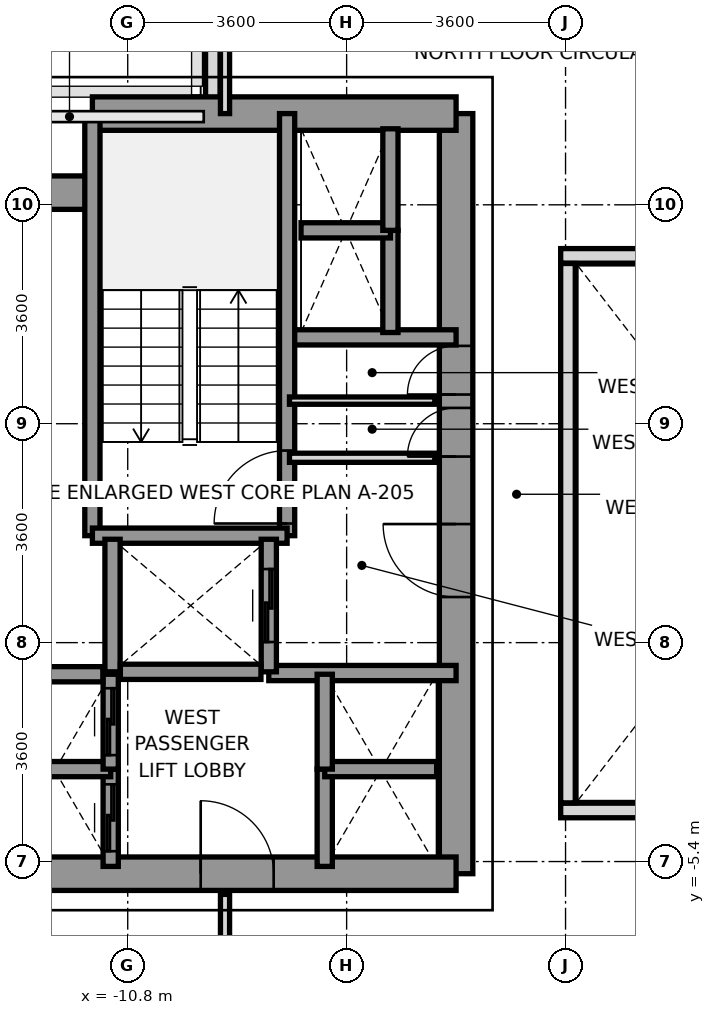
"""IFC4 building model, lengths in metres.
Left out: names, types, materials, properties, quantities, classifications, styles, units other than length and angle.
Written with IfcOpenShell. Run it as: python <this file> out.ifc"""

import sys

from ifc_helpers import new_model, si_unit, direction, frame, frame_2d, origin, place, context, subcontext, project, spatial, rectangle, extrude, source, transform, mapped, element, fill, save


model = new_model("IFC4")
c1 = context("Model", 3, precision=1e-05, world=origin(), true_north=direction((0.0, 1.0)))
c2 = subcontext(c1, "Body", "Model", "MODEL_VIEW")
j1 = project(units=[si_unit("LENGTHUNIT", "METRE"), si_unit("PLANEANGLEUNIT", "RADIAN")], contexts=[c1])
p1 = place(None, origin())
s1 = spatial("IfcSite", under=j1, at=p1, CompositionType="ELEMENT")
p2 = place(p1, origin())
s2 = spatial("IfcBuilding", under=s1, at=p2, CompositionType="ELEMENT")
p3 = place(p2, frame((0.0, 0.0, 47.6)))
s3 = spatial("IfcBuildingStorey", under=s2, at=p3, CompositionType="ELEMENT", Elevation=47.6)
p4 = place(p3, frame((-9.4, 6.953, 0.0), z_axis=(0.0, 0.0, 1.0), x_axis=(0.0, 1.0, 0.0)))
e1 = element("IfcWall", 1, at=p4, inside=s3, PredefinedType="PARAPET", context=c2, shape_type="SweptSolid", body=[
    extrude(rectangle(XDim=1.444, YDim=0.24, at=frame_2d((0.722, 0.0))), origin(), (0.0, 0.0, 1.0), 1.15),
])
p5 = place(p3, frame((-5.4, -5.6, 0.0), z_axis=(0.0, 0.0, 1.0), x_axis=(0.0, 1.0, 0.0)))
e2 = element("IfcWall", 2, at=p5, inside=s3, PredefinedType="SHEAR", context=c2, shape_type="SweptSolid", body=[
    extrude(rectangle(XDim=12.5, YDim=0.55, at=frame_2d((6.25, 0.0))), origin(), (0.0, 0.0, 1.0), 3.2),
])
p6 = place(p5, frame((4.55, 0.0, 0.0)))
e3 = element("IfcOpeningElement", 3, at=p6, cuts=e2, PredefinedType="OPENING", context=c2, shape_type="SweptSolid", body=[
    extrude(rectangle(XDim=1.2, YDim=2.2, at=frame_2d((0.6, 1.1))), frame((0.0, 0.285, 0.0), z_axis=(0.0, -1.0, 0.0), x_axis=(1.0, 0.0, 0.0)), (0.0, 0.0, 1.0), 0.57),
])
p7 = place(p5, frame((6.86, 0.0, 0.0)))
e4 = element("IfcOpeningElement", 4, at=p7, cuts=e2, PredefinedType="OPENING", context=c2, shape_type="SweptSolid", body=[
    extrude(rectangle(XDim=0.8, YDim=2.1, at=frame_2d((0.4, 1.05))), frame((0.0, 0.285, 0.0), z_axis=(0.0, -1.0, 0.0), x_axis=(1.0, 0.0, 0.0)), (0.0, 0.0, 1.0), 0.57),
])
p8 = place(p5, frame((7.88, 0.0, 0.0)))
e5 = element("IfcOpeningElement", 5, at=p8, cuts=e2, PredefinedType="OPENING", context=c2, shape_type="SweptSolid", body=[
    extrude(rectangle(XDim=0.8, YDim=2.1, at=frame_2d((0.4, 1.05))), frame((0.0, 0.285, 0.0), z_axis=(0.0, -1.0, 0.0), x_axis=(1.0, 0.0, 0.0)), (0.0, 0.0, 1.0), 0.57),
])
p9 = place(p3, frame((-11.381, 6.9, 0.0), z_axis=(0.0, 0.0, 1.0), x_axis=(1.0, 0.0, 0.0)))
e6 = element("IfcWall", 6, at=p9, inside=s3, PredefinedType="SHEAR", context=c2, shape_type="SweptSolid", body=[
    extrude(rectangle(XDim=5.981, YDim=0.55, at=frame_2d((2.991, 0.0))), origin(), (0.0, 0.0, 1.0), 3.2),
])
p10 = place(p3, frame((-13.2, 5.6, 0.0), z_axis=(0.0, 0.0, 1.0), x_axis=(1.0, 0.0, 0.0)))
e7 = element("IfcWall", 7, at=p10, inside=s3, PredefinedType="SHEAR", context=c2, shape_type="SweptSolid", body=[
    extrude(rectangle(XDim=1.819, YDim=0.55, at=frame_2d((0.909, 0.0))), origin(), (0.0, 0.0, 1.0), 3.2),
])
p11 = place(p3, frame((-13.2, -5.6, 0.0), z_axis=(0.0, 0.0, 1.0), x_axis=(1.0, 0.0, 0.0)))
e8 = element("IfcWall", 8, at=p11, inside=s3, PredefinedType="SHEAR", context=c2, shape_type="SweptSolid", body=[
    extrude(rectangle(XDim=7.8, YDim=0.55, at=frame_2d((3.9, 0.0))), origin(), (0.0, 0.0, 1.0), 3.2),
])
p12 = place(p11, frame((3.6, 0.0, 0.0)))
e9 = element("IfcOpeningElement", 9, at=p12, cuts=e8, PredefinedType="OPENING", context=c2, shape_type="SweptSolid", body=[
    extrude(rectangle(XDim=1.2, YDim=2.2, at=frame_2d((0.6, 1.1))), frame((0.0, 0.285, 0.0), z_axis=(0.0, -1.0, 0.0), x_axis=(1.0, 0.0, 0.0)), (0.0, 0.0, 1.0), 0.57),
])
p13 = place(p3, frame((-8.18, 3.22, 0.0), z_axis=(0.0, 0.0, 1.0), x_axis=(1.0, 0.0, 0.0)))
e10 = element("IfcWall", 10, at=p13, inside=s3, PredefinedType="SOLIDWALL", context=c2, shape_type="SweptSolid", body=[
    extrude(rectangle(XDim=2.78, YDim=0.25, at=frame_2d((1.39, 0.0))), origin(), (0.0, 0.0, 1.0), 3.2),
])
p14 = place(p3, frame((-8.48, -2.3, 0.0), z_axis=(0.0, 0.0, 1.0), x_axis=(1.0, 0.0, 0.0)))
e11 = element("IfcWall", 11, at=p14, inside=s3, PredefinedType="SOLIDWALL", context=c2, shape_type="SweptSolid", body=[
    extrude(rectangle(XDim=3.08, YDim=0.25, at=frame_2d((1.54, 0.0))), origin(), (0.0, 0.0, 1.0), 3.2),
])
p15 = place(p3, frame((-8.179, -0.041, 0.0), z_axis=(0.0, 0.0, 1.0), x_axis=(0.0, 1.0, 0.0)))
e12 = element("IfcWall", 12, at=p15, inside=s3, PredefinedType="SOLIDWALL", context=c2, shape_type="SweptSolid", body=[
    extrude(rectangle(XDim=6.941, YDim=0.25, at=frame_2d((3.47, 0.0))), origin(), (0.0, 0.0, 1.0), 3.2),
])
p16 = place(p15, frame((0.2, 0.0, 0.0)))
e13 = element("IfcOpeningElement", 13, at=p16, cuts=e12, PredefinedType="OPENING", context=c2, shape_type="SweptSolid", body=[
    extrude(rectangle(XDim=1.2, YDim=2.2, at=frame_2d((0.6, 1.1))), frame((0.0, 0.135, 0.0), z_axis=(0.0, -1.0, 0.0), x_axis=(1.0, 0.0, 0.0)), (0.0, 0.0, 1.0), 0.27),
])
p17 = place(p3, frame((-11.381, -0.041, 0.0), z_axis=(0.0, 0.0, 1.0), x_axis=(0.0, 1.0, 0.0)))
e14 = element("IfcWall", 14, at=p17, inside=s3, PredefinedType="SOLIDWALL", context=c2, shape_type="SweptSolid", body=[
    extrude(rectangle(XDim=6.941, YDim=0.25, at=frame_2d((3.47, 0.0))), origin(), (0.0, 0.0, 1.0), 3.2),
])
p18 = place(p3, frame((-11.381, -0.041, 0.0), z_axis=(0.0, 0.0, 1.0), x_axis=(1.0, 0.0, 0.0)))
e15 = element("IfcWall", 15, at=p18, inside=s3, PredefinedType="SOLIDWALL", context=c2, shape_type="SweptSolid", body=[
    extrude(rectangle(XDim=3.202, YDim=0.25, at=frame_2d((1.601, 0.0))), origin(), (0.0, 0.0, 1.0), 3.2),
])
p19 = place(p3, frame((-11.05, -2.28, 0.0), z_axis=(0.0, 0.0, 1.0), x_axis=(0.0, 1.0, 0.0)))
e16 = element("IfcWall", 16, at=p19, inside=s3, PredefinedType="SOLIDWALL", context=c2, shape_type="SweptSolid", body=[
    extrude(rectangle(XDim=2.18, YDim=0.25, at=frame_2d((1.09, 0.0))), origin(), (0.0, 0.0, 1.0), 3.2),
])
p20 = place(p3, frame((-8.48, -2.28, 0.0), z_axis=(0.0, 0.0, 1.0), x_axis=(0.0, 1.0, 0.0)))
e17 = element("IfcWall", 17, at=p20, inside=s3, PredefinedType="SOLIDWALL", context=c2, shape_type="SweptSolid", body=[
    extrude(rectangle(XDim=2.18, YDim=0.25, at=frame_2d((1.09, 0.0))), origin(), (0.0, 0.0, 1.0), 3.2),
])
p21 = place(p20, frame((0.49, 0.0, 0.0)))
e18 = element("IfcOpeningElement", 18, at=p21, cuts=e17, PredefinedType="OPENING", context=c2, shape_type="SweptSolid", body=[
    extrude(rectangle(XDim=1.2, YDim=2.2, at=frame_2d((0.6, 1.1))), frame((0.0, 0.135, 0.0), z_axis=(0.0, -1.0, 0.0), x_axis=(1.0, 0.0, 0.0)), (0.0, 0.0, 1.0), 0.27),
])
p22 = place(p3, frame((-10.921, -2.28, 0.0), z_axis=(0.0, 0.0, 1.0), x_axis=(1.0, 0.0, 0.0)))
e19 = element("IfcWall", 19, at=p22, inside=s3, PredefinedType="SOLIDWALL", context=c2, shape_type="SweptSolid", body=[
    extrude(rectangle(XDim=2.312, YDim=0.25, at=frame_2d((1.156, 0.0))), origin(), (0.0, 0.0, 1.0), 3.2),
])
p23 = place(p3, frame((-11.08, -5.48, 0.0), z_axis=(0.0, 0.0, 1.0), x_axis=(0.0, 1.0, 0.0)))
e20 = element("IfcWall", 20, at=p23, inside=s3, PredefinedType="SOLIDWALL", context=c2, shape_type="SweptSolid", body=[
    extrude(rectangle(XDim=1.6, YDim=0.25, at=frame_2d((0.8, 0.0))), origin(), (0.0, 0.0, 1.0), 3.2),
])
p24 = place(p23, frame((0.25, 0.0, 0.0)))
e21 = element("IfcOpeningElement", 21, at=p24, cuts=e20, PredefinedType="OPENING", context=c2, shape_type="SweptSolid", body=[
    extrude(rectangle(XDim=1.1, YDim=2.2, at=frame_2d((0.55, 1.1))), frame((0.0, 0.135, 0.0), z_axis=(0.0, -1.0, 0.0), x_axis=(1.0, 0.0, 0.0)), (0.0, 0.0, 1.0), 0.27),
])
p25 = place(p3, frame((-12.92, -3.88, 0.0), z_axis=(0.0, 0.0, 1.0), x_axis=(1.0, 0.0, 0.0)))
e22 = element("IfcWall", 22, at=p25, inside=s3, PredefinedType="SOLIDWALL", context=c2, shape_type="SweptSolid", body=[
    extrude(rectangle(XDim=1.84, YDim=0.25, at=frame_2d((0.92, 0.0))), origin(), (0.0, 0.0, 1.0), 3.2),
])
p26 = place(p3, frame((-11.08, -3.88, 0.0), z_axis=(0.0, 0.0, 1.0), x_axis=(0.0, 1.0, 0.0)))
e23 = element("IfcWall", 23, at=p26, inside=s3, PredefinedType="SOLIDWALL", context=c2, shape_type="SweptSolid", body=[
    extrude(rectangle(XDim=1.56, YDim=0.25, at=frame_2d((0.78, 0.0))), origin(), (0.0, 0.0, 1.0), 3.2),
])
p27 = place(p26, frame((0.23, 0.0, 0.0)))
e24 = element("IfcOpeningElement", 24, at=p27, cuts=e23, PredefinedType="OPENING", context=c2, shape_type="SweptSolid", body=[
    extrude(rectangle(XDim=1.1, YDim=2.2, at=frame_2d((0.55, 1.1))), frame((0.0, 0.135, 0.0), z_axis=(0.0, -1.0, 0.0), x_axis=(1.0, 0.0, 0.0)), (0.0, 0.0, 1.0), 0.27),
])
p28 = place(p3, frame((-12.791, -2.32, 0.0), z_axis=(0.0, 0.0, 1.0), x_axis=(1.0, 0.0, 0.0)))
e25 = element("IfcWall", 25, at=p28, inside=s3, PredefinedType="SOLIDWALL", context=c2, shape_type="SweptSolid", body=[
    extrude(rectangle(XDim=1.582, YDim=0.25, at=frame_2d((0.791, 0.0))), origin(), (0.0, 0.0, 1.0), 3.2),
])
p29 = place(p3, frame((-7.56, -5.48, 0.0), z_axis=(0.0, 0.0, 1.0), x_axis=(0.0, 1.0, 0.0)))
e26 = element("IfcWall", 26, at=p29, inside=s3, PredefinedType="SOLIDWALL", context=c2, shape_type="SweptSolid", body=[
    extrude(rectangle(XDim=1.6, YDim=0.25, at=frame_2d((0.8, 0.0))), origin(), (0.0, 0.0, 1.0), 3.2),
])
p30 = place(p3, frame((-7.56, -3.88, 0.0), z_axis=(0.0, 0.0, 1.0), x_axis=(1.0, 0.0, 0.0)))
e27 = element("IfcWall", 27, at=p30, inside=s3, PredefinedType="SOLIDWALL", context=c2, shape_type="SweptSolid", body=[
    extrude(rectangle(XDim=1.84, YDim=0.25, at=frame_2d((0.92, 0.0))), origin(), (0.0, 0.0, 1.0), 3.2),
])
p31 = place(p3, frame((-7.56, -3.88, 0.0), z_axis=(0.0, 0.0, 1.0), x_axis=(0.0, 1.0, 0.0)))
e28 = element("IfcWall", 28, at=p31, inside=s3, PredefinedType="SOLIDWALL", context=c2, shape_type="SweptSolid", body=[
    extrude(rectangle(XDim=1.56, YDim=0.25, at=frame_2d((0.78, 0.0))), origin(), (0.0, 0.0, 1.0), 3.2),
])
p32 = place(p3, frame((-6.48, 3.3, 0.0), z_axis=(0.0, 0.0, 1.0), x_axis=(0.0, 1.0, 0.0)))
e29 = element("IfcWall", 29, at=p32, inside=s3, PredefinedType="SOLIDWALL", context=c2, shape_type="SweptSolid", body=[
    extrude(rectangle(XDim=1.68, YDim=0.25, at=frame_2d((0.84, 0.0))), origin(), (0.0, 0.0, 1.0), 3.2),
])
p33 = place(p3, frame((-7.95, 4.98, 0.0), z_axis=(0.0, 0.0, 1.0), x_axis=(1.0, 0.0, 0.0)))
e30 = element("IfcWall", 30, at=p33, inside=s3, PredefinedType="SOLIDWALL", context=c2, shape_type="SweptSolid", body=[
    extrude(rectangle(XDim=1.47, YDim=0.25, at=frame_2d((0.735, 0.0))), origin(), (0.0, 0.0, 1.0), 3.2),
])
p34 = place(p3, frame((-6.48, 4.98, 0.0), z_axis=(0.0, 0.0, 1.0), x_axis=(0.0, 1.0, 0.0)))
e31 = element("IfcWall", 31, at=p34, inside=s3, PredefinedType="SOLIDWALL", context=c2, shape_type="SweptSolid", body=[
    extrude(rectangle(XDim=1.67, YDim=0.25, at=frame_2d((0.835, 0.0))), origin(), (0.0, 0.0, 1.0), 3.2),
])
p35 = place(p3, frame((-8.14, 1.24, 0.0), z_axis=(0.0, 0.0, 1.0), x_axis=(1.0, 0.0, 0.0)))
e32 = element("IfcWall", 32, at=p35, inside=s3, PredefinedType="PARTITIONING", context=c2, shape_type="SweptSolid", body=[
    extrude(rectangle(XDim=2.39, YDim=0.15, at=frame_2d((1.195, 0.0))), origin(), (0.0, 0.0, 1.0), 2.3),
])
p36 = place(p3, frame((-8.14, 2.18, 0.0), z_axis=(0.0, 0.0, 1.0), x_axis=(1.0, 0.0, 0.0)))
e33 = element("IfcWall", 33, at=p36, inside=s3, PredefinedType="PARTITIONING", context=c2, shape_type="SweptSolid", body=[
    extrude(rectangle(XDim=2.39, YDim=0.12, at=frame_2d((1.195, 0.0))), origin(), (0.0, 0.0, 1.0), 2.3),
])
p37 = place(p3, frame((-9.2, 6.9, 0.0), z_axis=(0.0, 0.0, 1.0), x_axis=(0.0, 1.0, 0.0)))
e34 = element("IfcWall", 34, at=p37, inside=s3, PredefinedType="PARTITIONING", context=c2, shape_type="SweptSolid", body=[
    extrude(rectangle(XDim=8.78, YDim=0.15, at=frame_2d((4.39, 0.0))), origin(), (0.0, 0.0, 1.0), 2.71),
])
p38 = place(p3, frame((-9.2, -15.68, 0.0), z_axis=(0.0, 0.0, 1.0), x_axis=(0.0, 1.0, 0.0)))
e35 = element("IfcWall", 35, at=p38, inside=s3, PredefinedType="PARTITIONING", context=c2, shape_type="SweptSolid", body=[
    extrude(rectangle(XDim=9.74, YDim=0.15, at=frame_2d((4.87, 0.0))), origin(), (0.0, 0.0, 1.0), 2.71),
])
for number, where, z_axis, x_axis in (
    (36, (-3.68, -4.56, 0.0), (0.0, 0.0, 1.0), (1.0, 0.0, 0.0)),
    (37, (-3.68, 4.56, 0.0), (0.0, 0.0, 1.0), (1.0, 0.0, 0.0)),
):
    element("IfcWall", number, at=place(p3, frame(where, z_axis=z_axis, x_axis=x_axis)), inside=s3, PredefinedType="PARAPET", context=c2, shape_type="SweptSolid", body=[
        extrude(rectangle(XDim=7.36, YDim=0.24, at=frame_2d((3.68, 0.0))), origin(), (0.0, 0.0, 1.0), 1.15),
    ])
p39 = place(p3, frame((-3.56, -4.435, 0.0), z_axis=(0.0, 0.0, 1.0), x_axis=(0.0, 1.0, 0.0)))
e38 = element("IfcWall", 38, at=p39, inside=s3, PredefinedType="PARAPET", context=c2, shape_type="SweptSolid", body=[
    extrude(rectangle(XDim=8.87, YDim=0.24, at=frame_2d((4.435, 0.0))), origin(), (0.0, 0.0, 1.0), 1.15),
])
m1 = source(origin(), c2, "Body", "SweptSolid", [
    extrude(rectangle(XDim=1.2, YDim=2.2, at=frame_2d((0.6, 1.1))), frame((0.0, 0.025, 0.0), z_axis=(0.0, -1.0, 0.0), x_axis=(1.0, 0.0, 0.0)), (0.0, 0.0, 1.0), 0.05),
])
p40 = place(p16, origin())
e39 = element("IfcDoor", 39, at=p40, inside=s3, OperationType="SINGLE_SWING_LEFT", PredefinedType="DOOR", context=c2, shape_type="MappedRepresentation", body=[
    mapped(m1, transform((0.0, 0.0, 0.0), x_axis=(1.0, 0.0, 0.0), y_axis=(0.0, 1.0, 0.0), z_axis=(0.0, 0.0, 1.0), scale=1.0)),
])
fill(e13, e39)
p41 = place(p6, origin())
e40 = element("IfcDoor", 40, at=p41, inside=s3, OperationType="SINGLE_SWING_RIGHT", PredefinedType="DOOR", context=c2, shape_type="MappedRepresentation", body=[
    mapped(m1, transform((0.0, 0.0, 0.0), x_axis=(1.0, 0.0, 0.0), y_axis=(0.0, 1.0, 0.0), z_axis=(0.0, 0.0, 1.0), scale=1.0)),
])
fill(e3, e40)
p42 = place(p12, origin())
e41 = element("IfcDoor", 41, at=p42, inside=s3, OperationType="SINGLE_SWING_LEFT", PredefinedType="DOOR", context=c2, shape_type="MappedRepresentation", body=[
    mapped(m1, transform((0.0, 0.0, 0.0), x_axis=(1.0, 0.0, 0.0), y_axis=(0.0, 1.0, 0.0), z_axis=(0.0, 0.0, 1.0), scale=1.0)),
])
fill(e9, e41)
m2 = source(origin(), c2, "Body", "SweptSolid", [
    extrude(rectangle(XDim=0.8, YDim=2.1, at=frame_2d((0.4, 1.05))), frame((0.0, 0.025, 0.0), z_axis=(0.0, -1.0, 0.0), x_axis=(1.0, 0.0, 0.0)), (0.0, 0.0, 1.0), 0.05),
])
p43 = place(p7, origin())
e42 = element("IfcDoor", 42, at=p43, inside=s3, OperationType="SINGLE_SWING_LEFT", PredefinedType="DOOR", context=c2, shape_type="MappedRepresentation", body=[
    mapped(m2, transform((0.0, 0.0, 0.0), x_axis=(1.0, 0.0, 0.0), y_axis=(0.0, 1.0, 0.0), z_axis=(0.0, 0.0, 1.0), scale=1.0)),
])
fill(e4, e42)
p44 = place(p8, origin())
e43 = element("IfcDoor", 43, at=p44, inside=s3, OperationType="SINGLE_SWING_LEFT", PredefinedType="DOOR", context=c2, shape_type="MappedRepresentation", body=[
    mapped(m2, transform((0.0, 0.0, 0.0), x_axis=(1.0, 0.0, 0.0), y_axis=(0.0, 1.0, 0.0), z_axis=(0.0, 0.0, 1.0), scale=1.0)),
])
fill(e5, e43)
p45 = place(p21, origin())
e44 = element("IfcDoor", 44, at=p45, inside=s3, OperationType="SLIDING_TO_RIGHT", PredefinedType="DOOR", context=c2, shape_type="MappedRepresentation", body=[
    mapped(m1, transform((0.0, 0.0, 0.0), x_axis=(1.0, 0.0, 0.0), y_axis=(0.0, 1.0, 0.0), z_axis=(0.0, 0.0, 1.0), scale=1.0)),
])
fill(e18, e44)
m3 = source(origin(), c2, "Body", "SweptSolid", [
    extrude(rectangle(XDim=1.1, YDim=2.2, at=frame_2d((0.55, 1.1))), frame((0.0, 0.025, 0.0), z_axis=(0.0, -1.0, 0.0), x_axis=(1.0, 0.0, 0.0)), (0.0, 0.0, 1.0), 0.05),
])
p46 = place(p24, origin())
e45 = element("IfcDoor", 45, at=p46, inside=s3, OperationType="SLIDING_TO_LEFT", PredefinedType="DOOR", context=c2, shape_type="MappedRepresentation", body=[
    mapped(m3, transform((0.0, 0.0, 0.0), x_axis=(1.0, 0.0, 0.0), y_axis=(0.0, 1.0, 0.0), z_axis=(0.0, 0.0, 1.0), scale=1.0)),
])
fill(e21, e45)
p47 = place(p27, origin())
e46 = element("IfcDoor", 46, at=p47, inside=s3, OperationType="SLIDING_TO_LEFT", PredefinedType="DOOR", context=c2, shape_type="MappedRepresentation", body=[
    mapped(m3, transform((0.0, 0.0, 0.0), x_axis=(1.0, 0.0, 0.0), y_axis=(0.0, 1.0, 0.0), z_axis=(0.0, 0.0, 1.0), scale=1.0)),
])
fill(e24, e46)
save(model, sys.argv[1])
